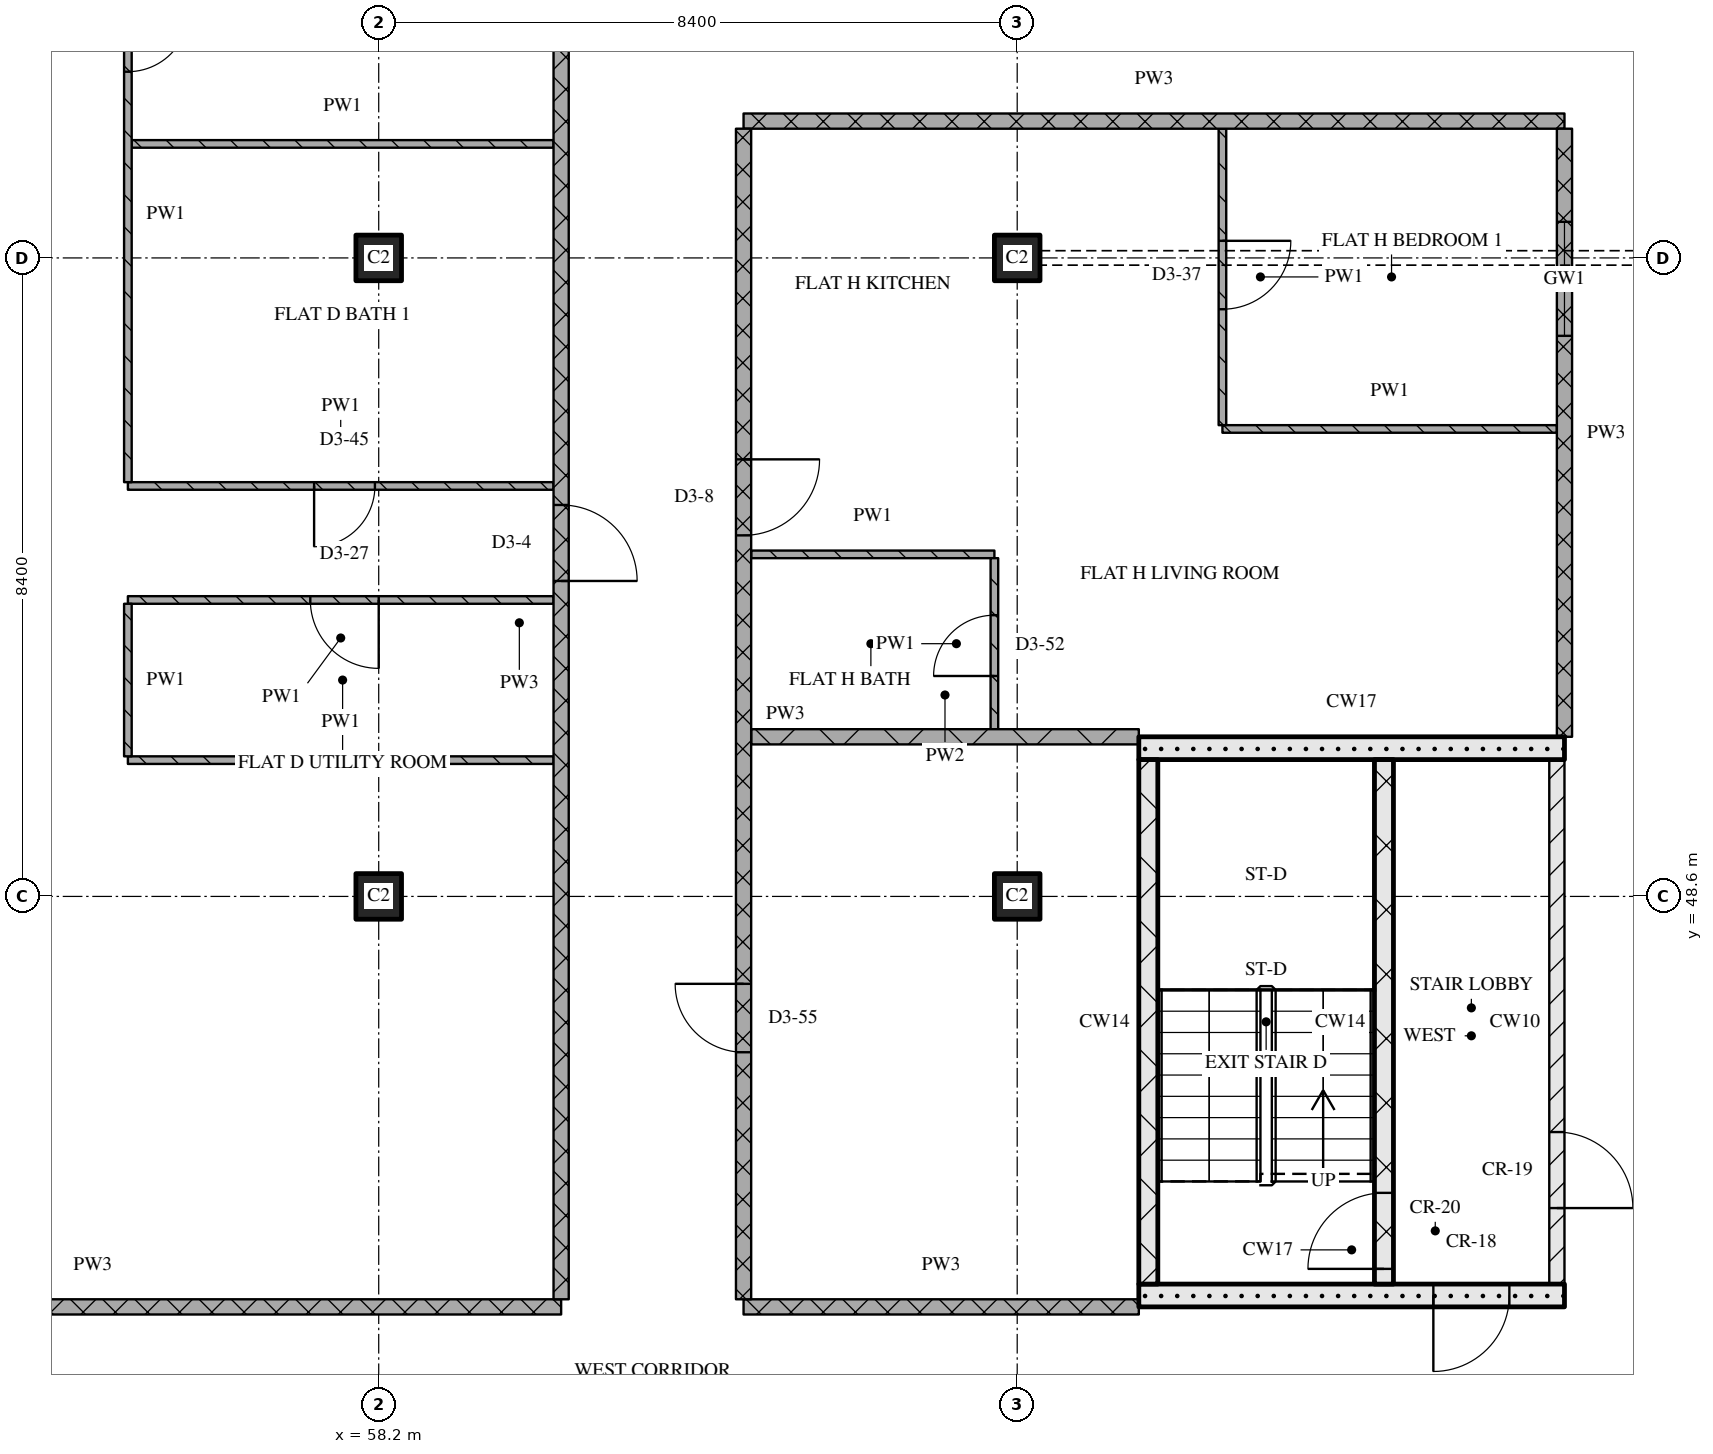
"""IFC4 building model, lengths in metres.
Left out: names, types, materials, properties, quantities, classifications, styles, units other than length and angle.
Written with IfcOpenShell. Run it as: python <this file> out.ifc"""

import sys

from ifc_helpers import new_model, si_unit, direction, frame, frame_2d, origin, origin_2d, place, context, subcontext, project, spatial, rectangle, extrude, element, fill, save


model = new_model("IFC4")
c1 = context("Model", 3, precision=1e-05, world=origin(), true_north=direction((0.0, 1.0)))
c2 = subcontext(c1, "Body", "Model", "MODEL_VIEW")
j1 = project(units=[si_unit("LENGTHUNIT", "METRE"), si_unit("PLANEANGLEUNIT", "RADIAN")], contexts=[c1])
p1 = place(None, origin())
s1 = spatial("IfcSite", under=j1, at=p1, CompositionType="ELEMENT")
p2 = place(p1, origin())
s2 = spatial("IfcBuilding", under=s1, at=p2, CompositionType="ELEMENT")
p3 = place(p2, frame((0.0, 0.0, 230.7)))
s3 = spatial("IfcBuildingStorey", under=s2, at=p3, CompositionType="ELEMENT", Elevation=230.7)
for number, where, z_axis, x_axis in (
    (1, (58.2, 48.6, 0.0), (0.0, 0.0, 1.0), (1.0, 0.0, 0.0)),
    (2, (58.2, 57.0, 0.0), (0.0, 0.0, 1.0), (1.0, 0.0, 0.0)),
    (3, (66.6, 48.6, 0.0), (0.0, 0.0, 1.0), (1.0, 0.0, 0.0)),
    (4, (66.6, 57.0, 0.0), (0.0, 0.0, 1.0), (1.0, 0.0, 0.0)),
):
    element("IfcColumn", number, at=place(p3, frame(where, z_axis=z_axis, x_axis=x_axis)), inside=s3, PredefinedType="COLUMN", context=c2, shape_type="SweptSolid", body=[
        extrude(rectangle(XDim=0.6, YDim=0.6, at=origin_2d()), origin(), (0.0, 0.0, 1.0), 3.6),
    ])
p4 = place(p3, frame((68.2, 43.35, 0.0), z_axis=(0.0, 0.0, 1.0), x_axis=(1.0, 0.0, 0.0)))
e5 = element("IfcWall", 5, at=p4, inside=s3, PredefinedType="SOLIDWALL", context=c2, shape_type="SweptSolid", body=[
    extrude(rectangle(XDim=5.6, YDim=0.3, at=frame_2d((2.8, 0.0))), origin(), (0.0, 0.0, 1.0), 3.32),
])
p5 = place(p4, frame((3.875, 0.0, 0.0)))
e6 = element("IfcOpeningElement", 6, at=p5, cuts=e5, PredefinedType="OPENING", context=c2, shape_type="SweptSolid", body=[
    extrude(rectangle(XDim=1.0, YDim=2.1, at=frame_2d((0.5, 1.05))), frame((0.0, 0.16, 0.0), z_axis=(0.0, -1.0, 0.0), x_axis=(1.0, 0.0, 0.0)), (0.0, 0.0, 1.0), 0.32),
])
p6 = place(p3, frame((68.325, 43.5, 0.0), z_axis=(0.0, 0.0, 1.0), x_axis=(0.0, 1.0, 0.0)))
e7 = element("IfcWall", 7, at=p6, inside=s3, PredefinedType="SOLIDWALL", context=c2, shape_type="SweptSolid", body=[
    extrude(rectangle(XDim=6.9, YDim=0.25, at=frame_2d((3.45, 0.0))), origin(), (0.0, 0.0, 1.0), 3.32),
])
p7 = place(p3, frame((71.425, 43.5, 0.0), z_axis=(0.0, 0.0, 1.0), x_axis=(0.0, 1.0, 0.0)))
e8 = element("IfcWall", 8, at=p7, inside=s3, PredefinedType="SOLIDWALL", context=c2, shape_type="SweptSolid", body=[
    extrude(rectangle(XDim=6.9, YDim=0.25, at=frame_2d((3.45, 0.0))), origin(), (0.0, 0.0, 1.0), 3.32),
])
p8 = place(p7, frame((0.2, 0.0, 0.0)))
e9 = element("IfcOpeningElement", 9, at=p8, cuts=e8, PredefinedType="OPENING", context=c2, shape_type="SweptSolid", body=[
    extrude(rectangle(XDim=1.0, YDim=2.1, at=frame_2d((0.5, 1.05))), frame((0.0, 0.135, 0.0), z_axis=(0.0, -1.0, 0.0), x_axis=(1.0, 0.0, 0.0)), (0.0, 0.0, 1.0), 0.27),
])
p9 = place(p3, frame((73.7, 43.5, 0.0), z_axis=(0.0, 0.0, 1.0), x_axis=(0.0, 1.0, 0.0)))
e10 = element("IfcWall", 10, at=p9, inside=s3, PredefinedType="PARTITIONING", context=c2, shape_type="SweptSolid", body=[
    extrude(rectangle(XDim=6.9, YDim=0.2, at=frame_2d((3.45, 0.0))), origin(), (0.0, 0.0, 1.0), 3.32),
])
p10 = place(p9, frame((1.0, 0.0, 0.0)))
e11 = element("IfcOpeningElement", 11, at=p10, cuts=e10, PredefinedType="OPENING", context=c2, shape_type="SweptSolid", body=[
    extrude(rectangle(XDim=1.0, YDim=2.1, at=frame_2d((0.5, 1.05))), frame((0.0, 0.11, 0.0), z_axis=(0.0, -1.0, 0.0), x_axis=(1.0, 0.0, 0.0)), (0.0, 0.0, 1.0), 0.22),
])
p11 = place(p3, frame((68.2, 50.55, 0.0), z_axis=(0.0, 0.0, 1.0), x_axis=(1.0, 0.0, 0.0)))
e12 = element("IfcWall", 12, at=p11, inside=s3, PredefinedType="SOLIDWALL", context=c2, shape_type="SweptSolid", body=[
    extrude(rectangle(XDim=5.6, YDim=0.3, at=frame_2d((2.8, 0.0))), origin(), (0.0, 0.0, 1.0), 3.32),
])
p12 = place(p3, frame((48.28, 43.2, 0.0), z_axis=(0.0, 0.0, 1.0), x_axis=(1.0, 0.0, 0.0)))
e13 = element("IfcWall", 13, at=p12, inside=s3, PredefinedType="PARTITIONING", context=c2, shape_type="SweptSolid", body=[
    extrude(rectangle(XDim=12.32, YDim=0.2, at=frame_2d((6.16, 0.0))), origin(), (0.0, 0.0, 1.0), 3.32),
])
p13 = place(p3, frame((63.0, 43.2, 0.0), z_axis=(0.0, 0.0, 1.0), x_axis=(1.0, 0.0, 0.0)))
e14 = element("IfcWall", 14, at=p13, inside=s3, PredefinedType="PARTITIONING", context=c2, shape_type="SweptSolid", body=[
    extrude(rectangle(XDim=5.2, YDim=0.2, at=frame_2d((2.6, 0.0))), origin(), (0.0, 0.0, 1.0), 3.32),
])
p14 = place(p3, frame((54.9, 50.393, 0.0), z_axis=(0.0, 0.0, 1.0), x_axis=(1.0, 0.0, 0.0)))
e15 = element("IfcWall", 15, at=p14, inside=s3, PredefinedType="PARTITIONING", context=c2, shape_type="SweptSolid", body=[
    extrude(rectangle(XDim=5.6, YDim=0.1, at=frame_2d((2.8, 0.0))), origin(), (0.0, 0.0, 1.0), 3.32),
])
p15 = place(p3, frame((63.1, 50.7, 0.0), z_axis=(0.0, 0.0, 1.0), x_axis=(1.0, 0.0, 0.0)))
e16 = element("IfcWall", 16, at=p15, inside=s3, PredefinedType="PARTITIONING", context=c2, shape_type="SweptSolid", body=[
    extrude(rectangle(XDim=5.1, YDim=0.2, at=frame_2d((2.55, 0.0))), origin(), (0.0, 0.0, 1.0), 3.32),
])
p16 = place(p3, frame((60.5, 52.5, 0.0), z_axis=(0.0, 0.0, 1.0), x_axis=(-1.0, 0.0, 0.0)))
e17 = element("IfcWall", 17, at=p16, inside=s3, PredefinedType="PARTITIONING", context=c2, shape_type="SweptSolid", body=[
    extrude(rectangle(XDim=5.6, YDim=0.1, at=frame_2d((2.8, 0.0))), origin(), (0.0, 0.0, 1.0), 3.32),
])
p17 = place(p16, frame((2.3, 0.0, 0.0)))
e18 = element("IfcOpeningElement", 18, at=p17, cuts=e17, PredefinedType="OPENING", context=c2, shape_type="SweptSolid", body=[
    extrude(rectangle(XDim=0.9, YDim=2.1, at=frame_2d((0.45, 1.05))), frame((0.0, 0.06, 0.0), z_axis=(0.0, -1.0, 0.0), x_axis=(1.0, 0.0, 0.0)), (0.0, 0.0, 1.0), 0.12),
])
p18 = place(p3, frame((63.1, 53.1, 0.0), z_axis=(0.0, 0.0, 1.0), x_axis=(1.0, 0.0, 0.0)))
e19 = element("IfcWall", 19, at=p18, inside=s3, PredefinedType="PARTITIONING", context=c2, shape_type="SweptSolid", body=[
    extrude(rectangle(XDim=3.2, YDim=0.1, at=frame_2d((1.6, 0.0))), origin(), (0.0, 0.0, 1.0), 3.32),
])
p19 = place(p3, frame((54.9, 54.0, 0.0), z_axis=(0.0, 0.0, 1.0), x_axis=(1.0, 0.0, 0.0)))
e20 = element("IfcWall", 20, at=p19, inside=s3, PredefinedType="PARTITIONING", context=c2, shape_type="SweptSolid", body=[
    extrude(rectangle(XDim=5.6, YDim=0.1, at=frame_2d((2.8, 0.0))), origin(), (0.0, 0.0, 1.0), 3.32),
])
p20 = place(p19, frame((2.45, 0.0, 0.0)))
e21 = element("IfcOpeningElement", 21, at=p20, cuts=e20, PredefinedType="OPENING", context=c2, shape_type="SweptSolid", body=[
    extrude(rectangle(XDim=0.8, YDim=2.1, at=frame_2d((0.4, 1.05))), frame((0.0, 0.06, 0.0), z_axis=(0.0, -1.0, 0.0), x_axis=(1.0, 0.0, 0.0)), (0.0, 0.0, 1.0), 0.12),
])
p21 = place(p3, frame((69.3, 54.75, 0.0), z_axis=(0.0, 0.0, 1.0), x_axis=(1.0, 0.0, 0.0)))
e22 = element("IfcWall", 22, at=p21, inside=s3, PredefinedType="PARTITIONING", context=c2, shape_type="SweptSolid", body=[
    extrude(rectangle(XDim=4.4, YDim=0.1, at=frame_2d((2.2, 0.0))), origin(), (0.0, 0.0, 1.0), 3.32),
])
p22 = place(p3, frame((54.95, 58.5, 0.0), z_axis=(0.0, 0.0, 1.0), x_axis=(1.0, 0.0, 0.0)))
e23 = element("IfcWall", 23, at=p22, inside=s3, PredefinedType="PARTITIONING", context=c2, shape_type="SweptSolid", body=[
    extrude(rectangle(XDim=5.55, YDim=0.1, at=frame_2d((2.775, 0.0))), origin(), (0.0, 0.0, 1.0), 3.32),
])
p23 = place(p3, frame((63.0, 58.8, 0.0), z_axis=(0.0, 0.0, 1.0), x_axis=(1.0, 0.0, 0.0)))
e24 = element("IfcWall", 24, at=p23, inside=s3, PredefinedType="PARTITIONING", context=c2, shape_type="SweptSolid", body=[
    extrude(rectangle(XDim=10.8, YDim=0.2, at=frame_2d((5.4, 0.0))), origin(), (0.0, 0.0, 1.0), 3.32),
])
p24 = place(p3, frame((54.9, 52.45, 0.0), z_axis=(0.0, 0.0, 1.0), x_axis=(0.0, -1.0, 0.0)))
e25 = element("IfcWall", 25, at=p24, inside=s3, PredefinedType="PARTITIONING", context=c2, shape_type="SweptSolid", body=[
    extrude(rectangle(XDim=2.007, YDim=0.1, at=frame_2d((1.003, 0.0))), origin(), (0.0, 0.0, 1.0), 3.32),
])
p25 = place(p3, frame((54.9, 61.1, 0.0), z_axis=(0.0, 0.0, 1.0), x_axis=(0.0, -1.0, 0.0)))
e26 = element("IfcWall", 26, at=p25, inside=s3, PredefinedType="PARTITIONING", context=c2, shape_type="SweptSolid", body=[
    extrude(rectangle(XDim=7.05, YDim=0.1, at=frame_2d((3.525, 0.0))), origin(), (0.0, 0.0, 1.0), 3.32),
])
p26 = place(p25, frame((0.85, 0.0, 0.0)))
e27 = element("IfcOpeningElement", 27, at=p26, cuts=e26, PredefinedType="OPENING", context=c2, shape_type="SweptSolid", body=[
    extrude(rectangle(XDim=0.8, YDim=2.1, at=frame_2d((0.4, 1.05))), frame((0.0, 0.06, 0.0), z_axis=(0.0, -1.0, 0.0), x_axis=(1.0, 0.0, 0.0)), (0.0, 0.0, 1.0), 0.12),
])
p27 = place(p3, frame((60.6, 43.3, 0.0), z_axis=(0.0, 0.0, 1.0), x_axis=(0.0, 1.0, 0.0)))
e28 = element("IfcWall", 28, at=p27, inside=s3, PredefinedType="PARTITIONING", context=c2, shape_type="SweptSolid", body=[
    extrude(rectangle(XDim=17.8, YDim=0.2, at=frame_2d((8.9, 0.0))), origin(), (0.0, 0.0, 1.0), 3.32),
])
p28 = place(p27, frame((9.45, 0.0, 0.0)))
e29 = element("IfcOpeningElement", 29, at=p28, cuts=e28, PredefinedType="OPENING", context=c2, shape_type="SweptSolid", body=[
    extrude(rectangle(XDim=1.0, YDim=2.1, at=frame_2d((0.5, 1.05))), frame((0.0, 0.11, 0.0), z_axis=(0.0, -1.0, 0.0), x_axis=(1.0, 0.0, 0.0)), (0.0, 0.0, 1.0), 0.22),
])
p29 = place(p3, frame((63.0, 58.7, 0.0), z_axis=(0.0, 0.0, 1.0), x_axis=(0.0, -1.0, 0.0)))
e30 = element("IfcWall", 30, at=p29, inside=s3, PredefinedType="PARTITIONING", context=c2, shape_type="SweptSolid", body=[
    extrude(rectangle(XDim=15.4, YDim=0.2, at=frame_2d((7.7, 0.0))), origin(), (0.0, 0.0, 1.0), 3.32),
])
p30 = place(p29, frame((4.35, 0.0, 0.0)))
e31 = element("IfcOpeningElement", 31, at=p30, cuts=e30, PredefinedType="OPENING", context=c2, shape_type="SweptSolid", body=[
    extrude(rectangle(XDim=1.0, YDim=2.1, at=frame_2d((0.5, 1.05))), frame((0.0, 0.11, 0.0), z_axis=(0.0, -1.0, 0.0), x_axis=(1.0, 0.0, 0.0)), (0.0, 0.0, 1.0), 0.22),
])
p31 = place(p29, frame((11.25, 0.0, 0.0)))
e32 = element("IfcOpeningElement", 32, at=p31, cuts=e30, PredefinedType="OPENING", context=c2, shape_type="SweptSolid", body=[
    extrude(rectangle(XDim=0.9, YDim=2.1, at=frame_2d((0.45, 1.05))), frame((0.0, 0.11, 0.0), z_axis=(0.0, -1.0, 0.0), x_axis=(1.0, 0.0, 0.0)), (0.0, 0.0, 1.0), 0.22),
])
p32 = place(p3, frame((66.3, 50.8, 0.0), z_axis=(0.0, 0.0, 1.0), x_axis=(0.0, 1.0, 0.0)))
e33 = element("IfcWall", 33, at=p32, inside=s3, PredefinedType="PARTITIONING", context=c2, shape_type="SweptSolid", body=[
    extrude(rectangle(XDim=2.25, YDim=0.1, at=frame_2d((1.125, 0.0))), origin(), (0.0, 0.0, 1.0), 3.32),
])
p33 = place(p32, frame((0.7, 0.0, 0.0)))
e34 = element("IfcOpeningElement", 34, at=p33, cuts=e33, PredefinedType="OPENING", context=c2, shape_type="SweptSolid", body=[
    extrude(rectangle(XDim=0.8, YDim=2.1, at=frame_2d((0.4, 1.05))), frame((0.0, 0.06, 0.0), z_axis=(0.0, -1.0, 0.0), x_axis=(1.0, 0.0, 0.0)), (0.0, 0.0, 1.0), 0.12),
])
p34 = place(p3, frame((69.3, 58.7, 0.0), z_axis=(0.0, 0.0, 1.0), x_axis=(0.0, -1.0, 0.0)))
e35 = element("IfcWall", 35, at=p34, inside=s3, PredefinedType="PARTITIONING", context=c2, shape_type="SweptSolid", body=[
    extrude(rectangle(XDim=3.9, YDim=0.1, at=frame_2d((1.95, 0.0))), origin(), (0.0, 0.0, 1.0), 3.32),
])
p35 = place(p34, frame((1.475, 0.0, 0.0)))
e36 = element("IfcOpeningElement", 36, at=p35, cuts=e35, PredefinedType="OPENING", context=c2, shape_type="SweptSolid", body=[
    extrude(rectangle(XDim=0.9, YDim=2.1, at=frame_2d((0.45, 1.05))), frame((0.0, 0.06, 0.0), z_axis=(0.0, -1.0, 0.0), x_axis=(1.0, 0.0, 0.0)), (0.0, 0.0, 1.0), 0.12),
])
p36 = place(p3, frame((73.8, 58.7, 0.0), z_axis=(0.0, 0.0, 1.0), x_axis=(0.0, -1.0, 0.0)))
e37 = element("IfcWall", 37, at=p36, inside=s3, PredefinedType="PARTITIONING", context=c2, shape_type="SweptSolid", body=[
    extrude(rectangle(XDim=8.0, YDim=0.2, at=frame_2d((4.0, 0.0))), origin(), (0.0, 0.0, 1.0), 3.32),
])
p37 = place(p36, frame((1.225, 0.0, 0.9)))
e38 = element("IfcOpeningElement", 38, at=p37, cuts=e37, PredefinedType="OPENING", context=c2, shape_type="SweptSolid", body=[
    extrude(rectangle(XDim=1.5, YDim=1.5, at=frame_2d((0.75, 0.75))), frame((0.0, 0.11, 0.0), z_axis=(0.0, -1.0, 0.0), x_axis=(1.0, 0.0, 0.0)), (0.0, 0.0, 1.0), 0.22),
])
p38 = place(p5, origin())
e39 = element("IfcDoor", 39, at=p38, inside=s3, OperationType="SINGLE_SWING_RIGHT", PredefinedType="DOOR", context=c2, shape_type="SweptSolid", body=[
    extrude(rectangle(XDim=1.0, YDim=2.1, at=frame_2d((0.5, 1.05))), frame((0.0, 0.025, 0.0), z_axis=(0.0, -1.0, 0.0), x_axis=(1.0, 0.0, 0.0)), (0.0, 0.0, 1.0), 0.05),
])
fill(e6, e39)
p39 = place(p8, origin())
e40 = element("IfcDoor", 40, at=p39, inside=s3, OperationType="SINGLE_SWING_LEFT", PredefinedType="DOOR", context=c2, shape_type="SweptSolid", body=[
    extrude(rectangle(XDim=1.0, YDim=2.1, at=frame_2d((0.5, 1.05))), frame((0.0, 0.025, 0.0), z_axis=(0.0, -1.0, 0.0), x_axis=(1.0, 0.0, 0.0)), (0.0, 0.0, 1.0), 0.05),
])
fill(e9, e40)
p40 = place(p10, origin())
e41 = element("IfcDoor", 41, at=p40, inside=s3, OperationType="SINGLE_SWING_RIGHT", PredefinedType="DOOR", context=c2, shape_type="SweptSolid", body=[
    extrude(rectangle(XDim=1.0, YDim=2.1, at=frame_2d((0.5, 1.05))), frame((0.0, 0.025, 0.0), z_axis=(0.0, -1.0, 0.0), x_axis=(1.0, 0.0, 0.0)), (0.0, 0.0, 1.0), 0.05),
])
fill(e11, e41)
p41 = place(p17, origin())
e42 = element("IfcDoor", 42, at=p41, inside=s3, OperationType="SINGLE_SWING_LEFT", PredefinedType="DOOR", context=c2, shape_type="SweptSolid", body=[
    extrude(rectangle(XDim=0.9, YDim=2.1, at=frame_2d((0.45, 1.05))), frame((0.0, 0.025, 0.0), z_axis=(0.0, -1.0, 0.0), x_axis=(1.0, 0.0, 0.0)), (0.0, 0.0, 1.0), 0.05),
])
fill(e18, e42)
p42 = place(p20, origin())
e43 = element("IfcDoor", 43, at=p42, inside=s3, OperationType="SINGLE_SWING_RIGHT", PredefinedType="DOOR", context=c2, shape_type="SweptSolid", body=[
    extrude(rectangle(XDim=0.8, YDim=2.1, at=frame_2d((0.4, 1.05))), frame((0.0, 0.025, 0.0), z_axis=(0.0, -1.0, 0.0), x_axis=(1.0, 0.0, 0.0)), (0.0, 0.0, 1.0), 0.05),
])
fill(e21, e43)
p43 = place(p26, origin())
e44 = element("IfcDoor", 44, at=p43, inside=s3, OperationType="SINGLE_SWING_LEFT", PredefinedType="DOOR", context=c2, shape_type="SweptSolid", body=[
    extrude(rectangle(XDim=0.8, YDim=2.1, at=frame_2d((0.4, 1.05))), frame((0.0, 0.025, 0.0), z_axis=(0.0, -1.0, 0.0), x_axis=(1.0, 0.0, 0.0)), (0.0, 0.0, 1.0), 0.05),
])
fill(e27, e44)
p44 = place(p28, origin())
e45 = element("IfcDoor", 45, at=p44, inside=s3, OperationType="SINGLE_SWING_RIGHT", PredefinedType="DOOR", context=c2, shape_type="SweptSolid", body=[
    extrude(rectangle(XDim=1.0, YDim=2.1, at=frame_2d((0.5, 1.05))), frame((0.0, 0.025, 0.0), z_axis=(0.0, -1.0, 0.0), x_axis=(1.0, 0.0, 0.0)), (0.0, 0.0, 1.0), 0.05),
])
fill(e29, e45)
p45 = place(p30, origin())
e46 = element("IfcDoor", 46, at=p45, inside=s3, OperationType="SINGLE_SWING_LEFT", PredefinedType="DOOR", context=c2, shape_type="SweptSolid", body=[
    extrude(rectangle(XDim=1.0, YDim=2.1, at=frame_2d((0.5, 1.05))), frame((0.0, 0.025, 0.0), z_axis=(0.0, -1.0, 0.0), x_axis=(1.0, 0.0, 0.0)), (0.0, 0.0, 1.0), 0.05),
])
fill(e31, e46)
p46 = place(p31, origin())
e47 = element("IfcDoor", 47, at=p46, inside=s3, OperationType="SINGLE_SWING_RIGHT", PredefinedType="DOOR", context=c2, shape_type="SweptSolid", body=[
    extrude(rectangle(XDim=0.9, YDim=2.1, at=frame_2d((0.45, 1.05))), frame((0.0, 0.025, 0.0), z_axis=(0.0, -1.0, 0.0), x_axis=(1.0, 0.0, 0.0)), (0.0, 0.0, 1.0), 0.05),
])
fill(e32, e47)
p47 = place(p33, origin())
e48 = element("IfcDoor", 48, at=p47, inside=s3, OperationType="SINGLE_SWING_LEFT", PredefinedType="DOOR", context=c2, shape_type="SweptSolid", body=[
    extrude(rectangle(XDim=0.8, YDim=2.1, at=frame_2d((0.4, 1.05))), frame((0.0, 0.025, 0.0), z_axis=(0.0, -1.0, 0.0), x_axis=(1.0, 0.0, 0.0)), (0.0, 0.0, 1.0), 0.05),
])
fill(e34, e48)
p48 = place(p35, origin())
e49 = element("IfcDoor", 49, at=p48, inside=s3, OperationType="SINGLE_SWING_LEFT", PredefinedType="DOOR", context=c2, shape_type="SweptSolid", body=[
    extrude(rectangle(XDim=0.9, YDim=2.1, at=frame_2d((0.45, 1.05))), frame((0.0, 0.025, 0.0), z_axis=(0.0, -1.0, 0.0), x_axis=(1.0, 0.0, 0.0)), (0.0, 0.0, 1.0), 0.05),
])
fill(e36, e49)
p49 = place(p37, origin())
e50 = element("IfcWindow", 50, at=p49, inside=s3, PartitioningType="SINGLE_PANEL", PredefinedType="WINDOW", context=c2, shape_type="SweptSolid", body=[
    extrude(rectangle(XDim=1.5, YDim=1.5, at=frame_2d((0.75, 0.75))), frame((0.0, 0.03, 0.0), z_axis=(0.0, -1.0, 0.0), x_axis=(1.0, 0.0, 0.0)), (0.0, 0.0, 1.0), 0.06),
])
fill(e38, e50)
save(model, sys.argv[1])
